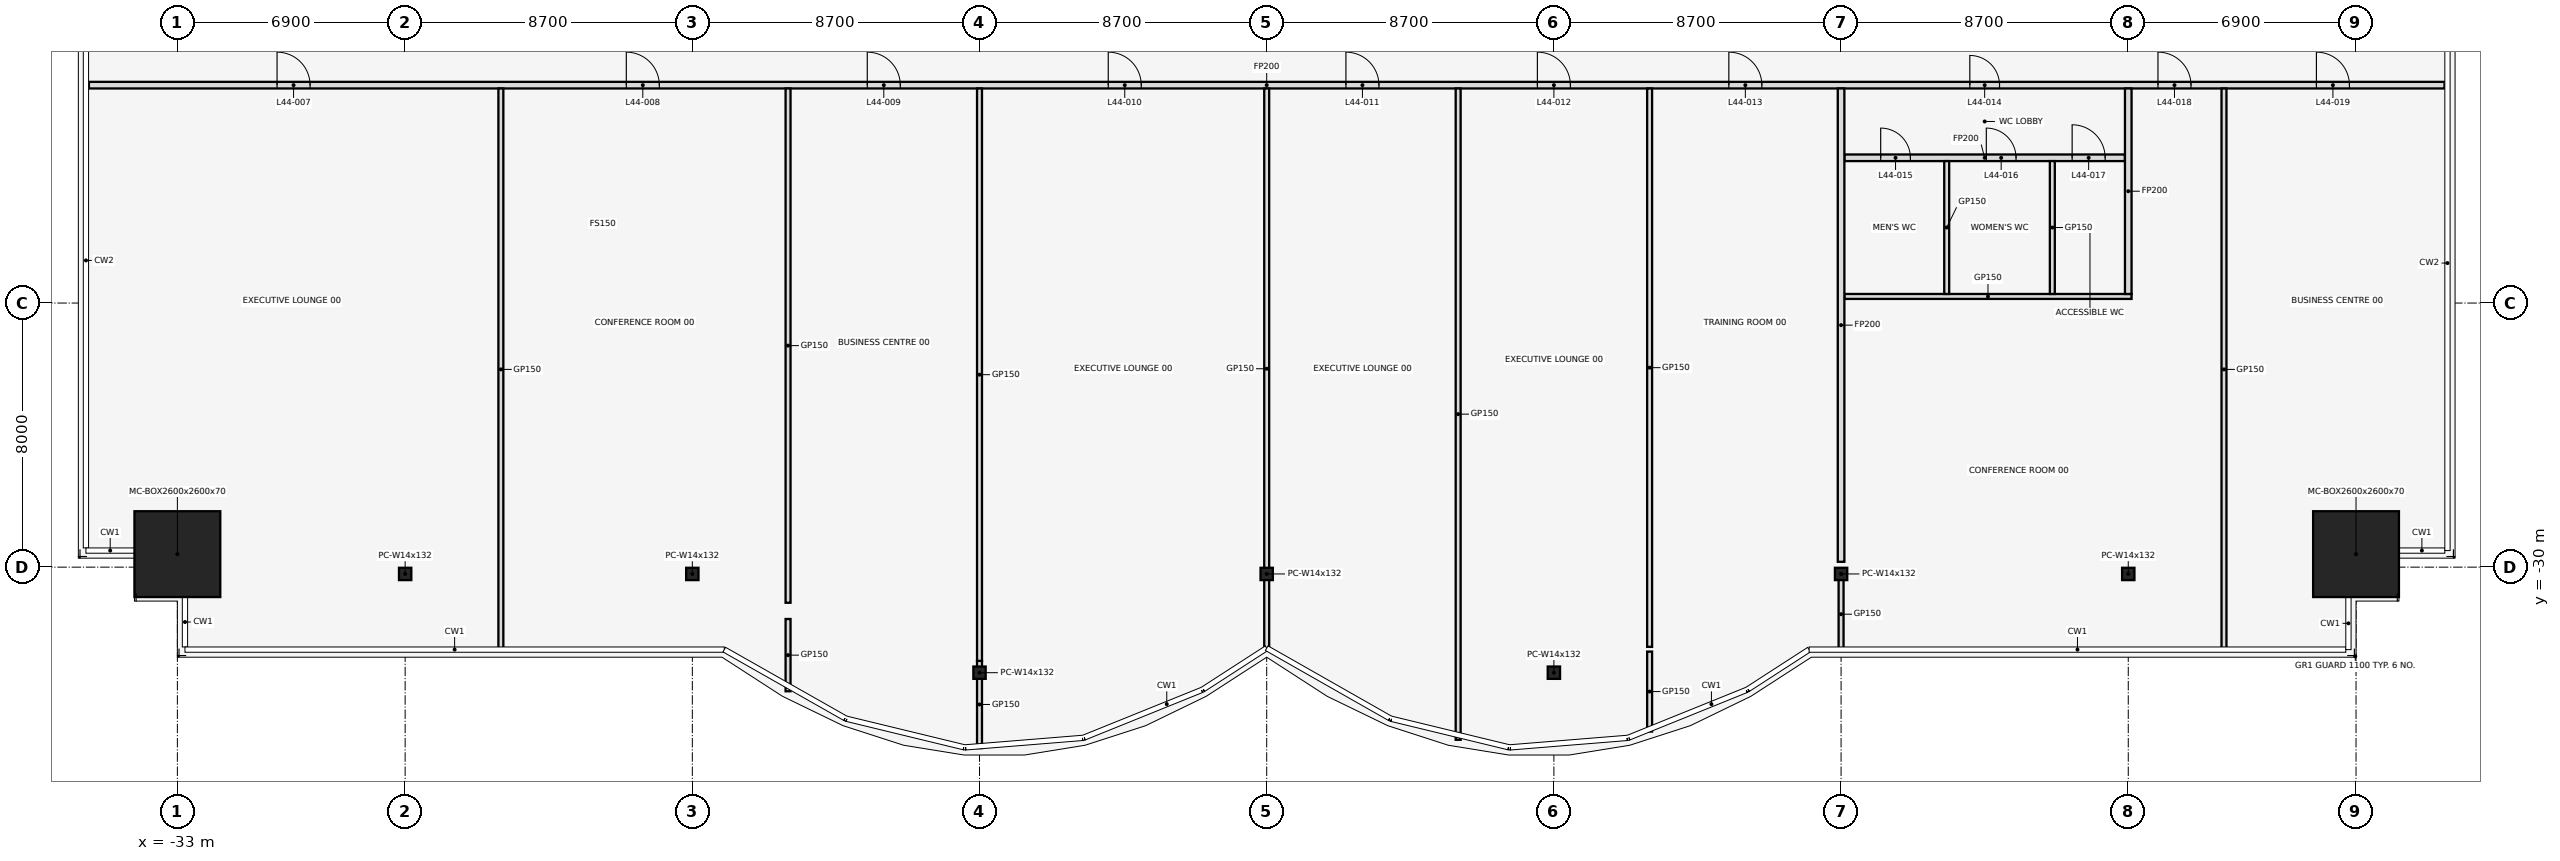
"""IFC4 building model, lengths in metres.
Left out: names, types, materials, properties, quantities, classifications, styles, units other than length and angle.
Written with IfcOpenShell. Run it as: python <this file> out.ifc"""

import sys

from ifc_helpers import new_model, si_unit, direction, frame, frame_2d, origin, origin_2d, place, context, subcontext, project, spatial, rectangle, hollow_rectangle, i_section, extrude, element, fill, save


model = new_model("IFC4")
c1 = context("Model", 3, precision=1e-05, world=origin(), true_north=direction((0.0, 1.0)))
c2 = subcontext(c1, "Body", "Model", "MODEL_VIEW")
j1 = project(units=[si_unit("LENGTHUNIT", "METRE"), si_unit("PLANEANGLEUNIT", "RADIAN")], contexts=[c1])
p1 = place(None, origin())
s1 = spatial("IfcSite", under=j1, at=p1, CompositionType="ELEMENT")
p2 = place(p1, origin())
s2 = spatial("IfcBuilding", under=s1, at=p2, CompositionType="ELEMENT")
p3 = place(p2, frame((0.0, 0.0, 199.1)))
s3 = spatial("IfcBuildingStorey", under=s2, at=p3, CompositionType="ELEMENT", Elevation=199.1)
p4 = place(p3, frame((-33.0, -29.606, 0.0), z_axis=(0.0, 0.0, 1.0), x_axis=(1.0, 0.0, 0.0)))
e1 = element("IfcColumn", 1, at=p4, inside=s3, PredefinedType="COLUMN", context=c2, shape_type="SweptSolid", body=[
    extrude(hollow_rectangle(XDim=2.6, YDim=2.6, WallThickness=0.07, at=origin_2d()), origin(), (0.0, 0.0, 1.0), 4.1),
])
for number, where, z_axis, x_axis in (
    (2, (-26.1, -30.206, 0.0), (0.0, 0.0, 1.0), (1.0, 0.0, 0.0)),
    (3, (-17.4, -30.206, 0.0), (0.0, 0.0, 1.0), (1.0, 0.0, 0.0)),
    (4, (-8.7, -33.197, 0.0), (0.0, 0.0, 1.0), (1.0, 0.0, 0.0)),
    (5, (0.0, -30.206, 0.0), (0.0, 0.0, 1.0), (1.0, 0.0, 0.0)),
    (6, (8.7, -33.197, 0.0), (0.0, 0.0, 1.0), (1.0, 0.0, 0.0)),
    (7, (17.4, -30.206, 0.0), (0.0, 0.0, 1.0), (1.0, 0.0, 0.0)),
    (8, (26.1, -30.206, 0.0), (0.0, 0.0, 1.0), (1.0, 0.0, 0.0)),
):
    element("IfcColumn", number, at=place(p3, frame(where, z_axis=z_axis, x_axis=x_axis)), inside=s3, PredefinedType="COLUMN", context=c2, shape_type="SweptSolid", body=[
        extrude(i_section(OverallWidth=0.373, OverallDepth=0.373, WebThickness=0.016, FlangeThickness=0.026, at=origin_2d()), origin(), (0.0, 0.0, 1.0), 4.1),
    ])
p5 = place(p3, frame((33.0, -29.606, 0.0), z_axis=(0.0, 0.0, 1.0), x_axis=(1.0, 0.0, 0.0)))
e9 = element("IfcColumn", 9, at=p5, inside=s3, PredefinedType="COLUMN", context=c2, shape_type="SweptSolid", body=[
    extrude(hollow_rectangle(XDim=2.6, YDim=2.6, WallThickness=0.07, at=origin_2d()), origin(), (0.0, 0.0, 1.0), 4.1),
])
p6 = place(p3, frame((17.5, -21.8, 0.0), z_axis=(0.0, 0.0, 1.0), x_axis=(1.0, 0.0, 0.0)))
e10 = element("IfcWall", 10, at=p6, inside=s3, PredefinedType="PARTITIONING", context=c2, shape_type="SweptSolid", body=[
    extrude(rectangle(XDim=8.7, YDim=0.15, at=frame_2d((4.35, 0.0))), origin(), (0.0, 0.0, 1.0), 2.84),
])
p7 = place(p3, frame((17.5, -17.6, 0.0), z_axis=(0.0, 0.0, 1.0), x_axis=(1.0, 0.0, 0.0)))
e11 = element("IfcWall", 11, at=p7, inside=s3, PredefinedType="PARTITIONING", context=c2, shape_type="SweptSolid", body=[
    extrude(rectangle(XDim=8.5, YDim=0.2, at=frame_2d((4.25, 0.0))), origin(), (0.0, 0.0, 1.0), 2.84),
])
p8 = place(p7, frame((1.1, 0.0, 0.0)))
e12 = element("IfcOpeningElement", 12, at=p8, cuts=e11, PredefinedType="OPENING", context=c2, shape_type="SweptSolid", body=[
    extrude(rectangle(XDim=0.9, YDim=2.1, at=frame_2d((0.45, 1.05))), frame((0.0, 0.112, 0.0), z_axis=(0.0, -1.0, 0.0), x_axis=(1.0, 0.0, 0.0)), (0.0, 0.0, 1.0), 0.224),
])
p9 = place(p7, frame((4.3, 0.0, 0.0)))
e13 = element("IfcOpeningElement", 13, at=p9, cuts=e11, PredefinedType="OPENING", context=c2, shape_type="SweptSolid", body=[
    extrude(rectangle(XDim=0.9, YDim=2.1, at=frame_2d((0.45, 1.05))), frame((0.0, 0.112, 0.0), z_axis=(0.0, -1.0, 0.0), x_axis=(1.0, 0.0, 0.0)), (0.0, 0.0, 1.0), 0.224),
])
p10 = place(p7, frame((6.9, 0.0, 0.0)))
e14 = element("IfcOpeningElement", 14, at=p10, cuts=e11, PredefinedType="OPENING", context=c2, shape_type="SweptSolid", body=[
    extrude(rectangle(XDim=1.0, YDim=2.1, at=frame_2d((0.5, 1.05))), frame((0.0, 0.112, 0.0), z_axis=(0.0, -1.0, 0.0), x_axis=(1.0, 0.0, 0.0)), (0.0, 0.0, 1.0), 0.224),
])
p11 = place(p3, frame((-35.68, -15.4, 0.0), z_axis=(0.0, 0.0, 1.0), x_axis=(1.0, 0.0, 0.0)))
e15 = element("IfcWall", 15, at=p11, inside=s3, PredefinedType="PARTITIONING", context=c2, shape_type="SweptSolid", body=[
    extrude(rectangle(XDim=71.36, YDim=0.2, at=frame_2d((35.68, 0.0))), origin(), (0.0, 0.0, 1.0), 2.84),
])
p12 = place(p11, frame((5.7, 0.0, 0.0)))
e16 = element("IfcOpeningElement", 16, at=p12, cuts=e15, PredefinedType="OPENING", context=c2, shape_type="SweptSolid", body=[
    extrude(rectangle(XDim=1.0, YDim=2.1, at=frame_2d((0.5, 1.05))), frame((0.0, 0.112, 0.0), z_axis=(0.0, -1.0, 0.0), x_axis=(1.0, 0.0, 0.0)), (0.0, 0.0, 1.0), 0.224),
])
p13 = place(p11, frame((16.28, 0.0, 0.0)))
e17 = element("IfcOpeningElement", 17, at=p13, cuts=e15, PredefinedType="OPENING", context=c2, shape_type="SweptSolid", body=[
    extrude(rectangle(XDim=1.0, YDim=2.1, at=frame_2d((0.5, 1.05))), frame((0.0, 0.112, 0.0), z_axis=(0.0, -1.0, 0.0), x_axis=(1.0, 0.0, 0.0)), (0.0, 0.0, 1.0), 0.224),
])
p14 = place(p11, frame((23.58, 0.0, 0.0)))
e18 = element("IfcOpeningElement", 18, at=p14, cuts=e15, PredefinedType="OPENING", context=c2, shape_type="SweptSolid", body=[
    extrude(rectangle(XDim=1.0, YDim=2.1, at=frame_2d((0.5, 1.05))), frame((0.0, 0.112, 0.0), z_axis=(0.0, -1.0, 0.0), x_axis=(1.0, 0.0, 0.0)), (0.0, 0.0, 1.0), 0.224),
])
p15 = place(p11, frame((30.88, 0.0, 0.0)))
e19 = element("IfcOpeningElement", 19, at=p15, cuts=e15, PredefinedType="OPENING", context=c2, shape_type="SweptSolid", body=[
    extrude(rectangle(XDim=1.0, YDim=2.1, at=frame_2d((0.5, 1.05))), frame((0.0, 0.112, 0.0), z_axis=(0.0, -1.0, 0.0), x_axis=(1.0, 0.0, 0.0)), (0.0, 0.0, 1.0), 0.224),
])
p16 = place(p11, frame((38.08, 0.0, 0.0)))
e20 = element("IfcOpeningElement", 20, at=p16, cuts=e15, PredefinedType="OPENING", context=c2, shape_type="SweptSolid", body=[
    extrude(rectangle(XDim=1.0, YDim=2.1, at=frame_2d((0.5, 1.05))), frame((0.0, 0.112, 0.0), z_axis=(0.0, -1.0, 0.0), x_axis=(1.0, 0.0, 0.0)), (0.0, 0.0, 1.0), 0.224),
])
p17 = place(p11, frame((43.88, 0.0, 0.0)))
e21 = element("IfcOpeningElement", 21, at=p17, cuts=e15, PredefinedType="OPENING", context=c2, shape_type="SweptSolid", body=[
    extrude(rectangle(XDim=1.0, YDim=2.1, at=frame_2d((0.5, 1.05))), frame((0.0, 0.112, 0.0), z_axis=(0.0, -1.0, 0.0), x_axis=(1.0, 0.0, 0.0)), (0.0, 0.0, 1.0), 0.224),
])
p18 = place(p11, frame((49.68, 0.0, 0.0)))
e22 = element("IfcOpeningElement", 22, at=p18, cuts=e15, PredefinedType="OPENING", context=c2, shape_type="SweptSolid", body=[
    extrude(rectangle(XDim=1.0, YDim=2.1, at=frame_2d((0.5, 1.05))), frame((0.0, 0.112, 0.0), z_axis=(0.0, -1.0, 0.0), x_axis=(1.0, 0.0, 0.0)), (0.0, 0.0, 1.0), 0.224),
])
p19 = place(p11, frame((56.98, 0.0, 0.0)))
e23 = element("IfcOpeningElement", 23, at=p19, cuts=e15, PredefinedType="OPENING", context=c2, shape_type="SweptSolid", body=[
    extrude(rectangle(XDim=0.9, YDim=2.1, at=frame_2d((0.45, 1.05))), frame((0.0, 0.112, 0.0), z_axis=(0.0, -1.0, 0.0), x_axis=(1.0, 0.0, 0.0)), (0.0, 0.0, 1.0), 0.224),
])
p20 = place(p11, frame((62.68, 0.0, 0.0)))
e24 = element("IfcOpeningElement", 24, at=p20, cuts=e15, PredefinedType="OPENING", context=c2, shape_type="SweptSolid", body=[
    extrude(rectangle(XDim=1.0, YDim=2.1, at=frame_2d((0.5, 1.05))), frame((0.0, 0.112, 0.0), z_axis=(0.0, -1.0, 0.0), x_axis=(1.0, 0.0, 0.0)), (0.0, 0.0, 1.0), 0.224),
])
p21 = place(p11, frame((67.48, 0.0, 0.0)))
e25 = element("IfcOpeningElement", 25, at=p21, cuts=e15, PredefinedType="OPENING", context=c2, shape_type="SweptSolid", body=[
    extrude(rectangle(XDim=1.0, YDim=2.1, at=frame_2d((0.5, 1.05))), frame((0.0, 0.112, 0.0), z_axis=(0.0, -1.0, 0.0), x_axis=(1.0, 0.0, 0.0)), (0.0, 0.0, 1.0), 0.224),
])
p22 = place(p3, frame((-23.2, -32.52, 0.0), z_axis=(0.0, 0.0, 1.0), x_axis=(0.0, 1.0, 0.0)))
e26 = element("IfcWall", 26, at=p22, inside=s3, PredefinedType="PARTITIONING", context=c2, shape_type="SweptSolid", body=[
    extrude(rectangle(XDim=17.02, YDim=0.15, at=frame_2d((8.51, 0.0))), origin(), (0.0, 0.0, 1.0), 2.84),
])
p23 = place(p3, frame((-14.5, -33.76, 0.0), z_axis=(0.0, 0.0, 1.0), x_axis=(0.0, 1.0, 0.0)))
e27 = element("IfcWall", 27, at=p23, inside=s3, PredefinedType="PARTITIONING", context=c2, shape_type="SweptSolid", body=[
    extrude(rectangle(XDim=2.189, YDim=0.15, at=frame_2d((1.095, 0.0))), origin(), (0.0, 0.0, 1.0), 2.84),
])
p24 = place(p3, frame((-14.5, -31.079, 0.0), z_axis=(0.0, 0.0, 1.0), x_axis=(0.0, 1.0, 0.0)))
e28 = element("IfcWall", 28, at=p24, inside=s3, PredefinedType="PARTITIONING", context=c2, shape_type="SweptSolid", body=[
    extrude(rectangle(XDim=15.579, YDim=0.15, at=frame_2d((7.79, 0.0))), origin(), (0.0, 0.0, 1.0), 2.84),
])
p25 = place(p3, frame((-8.7, -35.48, 0.0), z_axis=(0.0, 0.0, 1.0), x_axis=(0.0, 1.0, 0.0)))
e29 = element("IfcWall", 29, at=p25, inside=s3, PredefinedType="PARTITIONING", context=c2, shape_type="SweptSolid", body=[
    extrude(rectangle(XDim=2.641, YDim=0.15, at=frame_2d((1.32, 0.0))), origin(), (0.0, 0.0, 1.0), 2.84),
])
p26 = place(p3, frame((-8.7, -32.839, 0.0), z_axis=(0.0, 0.0, 1.0), x_axis=(0.0, 1.0, 0.0)))
e30 = element("IfcWall", 30, at=p26, inside=s3, PredefinedType="PARTITIONING", context=c2, shape_type="SweptSolid", body=[
    extrude(rectangle(XDim=17.339, YDim=0.15, at=frame_2d((8.669, 0.0))), origin(), (0.0, 0.0, 1.0), 2.84),
])
p27 = place(p3, frame((0.0, -32.48, 0.0), z_axis=(0.0, 0.0, 1.0), x_axis=(0.0, 1.0, 0.0)))
e31 = element("IfcWall", 31, at=p27, inside=s3, PredefinedType="PARTITIONING", context=c2, shape_type="SweptSolid", body=[
    extrude(rectangle(XDim=16.98, YDim=0.15, at=frame_2d((8.49, 0.0))), origin(), (0.0, 0.0, 1.0), 2.84),
])
p28 = place(p3, frame((5.8, -35.23, 0.0), z_axis=(0.0, 0.0, 1.0), x_axis=(0.0, 1.0, 0.0)))
e32 = element("IfcWall", 32, at=p28, inside=s3, PredefinedType="PARTITIONING", context=c2, shape_type="SweptSolid", body=[
    extrude(rectangle(XDim=19.73, YDim=0.15, at=frame_2d((9.865, 0.0))), origin(), (0.0, 0.0, 1.0), 2.84),
])
p29 = place(p3, frame((11.6, -34.98, 0.0), z_axis=(0.0, 0.0, 1.0), x_axis=(0.0, 1.0, 0.0)))
e33 = element("IfcWall", 33, at=p29, inside=s3, PredefinedType="PARTITIONING", context=c2, shape_type="SweptSolid", body=[
    extrude(rectangle(XDim=2.422, YDim=0.15, at=frame_2d((1.211, 0.0))), origin(), (0.0, 0.0, 1.0), 2.84),
])
p30 = place(p3, frame((11.6, -32.415, 0.0), z_axis=(0.0, 0.0, 1.0), x_axis=(0.0, 1.0, 0.0)))
e34 = element("IfcWall", 34, at=p30, inside=s3, PredefinedType="PARTITIONING", context=c2, shape_type="SweptSolid", body=[
    extrude(rectangle(XDim=16.915, YDim=0.15, at=frame_2d((8.458, 0.0))), origin(), (0.0, 0.0, 1.0), 2.84),
])
p31 = place(p3, frame((17.4, -32.52, 0.0), z_axis=(0.0, 0.0, 1.0), x_axis=(0.0, 1.0, 0.0)))
e35 = element("IfcWall", 35, at=p31, inside=s3, PredefinedType="PARTITIONING", context=c2, shape_type="SweptSolid", body=[
    extrude(rectangle(XDim=2.19, YDim=0.15, at=frame_2d((1.095, 0.0))), origin(), (0.0, 0.0, 1.0), 2.84),
])
p32 = place(p3, frame((17.4, -29.838, 0.0), z_axis=(0.0, 0.0, 1.0), x_axis=(0.0, 1.0, 0.0)))
e36 = element("IfcWall", 36, at=p32, inside=s3, PredefinedType="PARTITIONING", context=c2, shape_type="SweptSolid", body=[
    extrude(rectangle(XDim=14.338, YDim=0.2, at=frame_2d((7.169, 0.0))), origin(), (0.0, 0.0, 1.0), 2.84),
])
for number, where, z_axis, x_axis in (
    (37, (20.6, -21.725, 0.0), (0.0, 0.0, 1.0), (0.0, 1.0, 0.0)),
    (38, (23.8, -21.725, 0.0), (0.0, 0.0, 1.0), (0.0, 1.0, 0.0)),
):
    element("IfcWall", number, at=place(p3, frame(where, z_axis=z_axis, x_axis=x_axis)), inside=s3, PredefinedType="PARTITIONING", context=c2, shape_type="SweptSolid", body=[
        extrude(rectangle(XDim=4.025, YDim=0.15, at=frame_2d((2.013, 0.0))), origin(), (0.0, 0.0, 1.0), 2.84),
    ])
p33 = place(p3, frame((26.1, -21.725, 0.0), z_axis=(0.0, 0.0, 1.0), x_axis=(0.0, 1.0, 0.0)))
e39 = element("IfcWall", 39, at=p33, inside=s3, PredefinedType="PARTITIONING", context=c2, shape_type="SweptSolid", body=[
    extrude(rectangle(XDim=6.225, YDim=0.2, at=frame_2d((3.113, 0.0))), origin(), (0.0, 0.0, 1.0), 2.84),
])
p34 = place(p3, frame((29.0, -32.52, 0.0), z_axis=(0.0, 0.0, 1.0), x_axis=(0.0, 1.0, 0.0)))
e40 = element("IfcWall", 40, at=p34, inside=s3, PredefinedType="PARTITIONING", context=c2, shape_type="SweptSolid", body=[
    extrude(rectangle(XDim=17.02, YDim=0.15, at=frame_2d((8.51, 0.0))), origin(), (0.0, 0.0, 1.0), 2.84),
])
p35 = place(p12, frame((1.0, 0.0, 0.0), z_axis=(0.0, 0.0, 1.0), x_axis=(-1.0, 0.0, 0.0)))
e41 = element("IfcDoor", 41, at=p35, inside=s3, OperationType="SINGLE_SWING_LEFT", PredefinedType="DOOR", context=c2, shape_type="SweptSolid", body=[
    extrude(rectangle(XDim=1.0, YDim=2.1, at=frame_2d((0.5, 1.05))), frame((0.0, 0.025, 0.0), z_axis=(0.0, -1.0, 0.0), x_axis=(1.0, 0.0, 0.0)), (0.0, 0.0, 1.0), 0.05),
])
fill(e16, e41)
p36 = place(p13, frame((1.0, 0.0, 0.0), z_axis=(0.0, 0.0, 1.0), x_axis=(-1.0, 0.0, 0.0)))
e42 = element("IfcDoor", 42, at=p36, inside=s3, OperationType="SINGLE_SWING_RIGHT", PredefinedType="DOOR", context=c2, shape_type="SweptSolid", body=[
    extrude(rectangle(XDim=1.0, YDim=2.1, at=frame_2d((0.5, 1.05))), frame((0.0, 0.025, 0.0), z_axis=(0.0, -1.0, 0.0), x_axis=(1.0, 0.0, 0.0)), (0.0, 0.0, 1.0), 0.05),
])
fill(e17, e42)
p37 = place(p14, frame((1.0, 0.0, 0.0), z_axis=(0.0, 0.0, 1.0), x_axis=(-1.0, 0.0, 0.0)))
e43 = element("IfcDoor", 43, at=p37, inside=s3, OperationType="SINGLE_SWING_RIGHT", PredefinedType="DOOR", context=c2, shape_type="SweptSolid", body=[
    extrude(rectangle(XDim=1.0, YDim=2.1, at=frame_2d((0.5, 1.05))), frame((0.0, 0.025, 0.0), z_axis=(0.0, -1.0, 0.0), x_axis=(1.0, 0.0, 0.0)), (0.0, 0.0, 1.0), 0.05),
])
fill(e18, e43)
p38 = place(p15, frame((1.0, 0.0, 0.0), z_axis=(0.0, 0.0, 1.0), x_axis=(-1.0, 0.0, 0.0)))
e44 = element("IfcDoor", 44, at=p38, inside=s3, OperationType="SINGLE_SWING_LEFT", PredefinedType="DOOR", context=c2, shape_type="SweptSolid", body=[
    extrude(rectangle(XDim=1.0, YDim=2.1, at=frame_2d((0.5, 1.05))), frame((0.0, 0.025, 0.0), z_axis=(0.0, -1.0, 0.0), x_axis=(1.0, 0.0, 0.0)), (0.0, 0.0, 1.0), 0.05),
])
fill(e19, e44)
p39 = place(p16, frame((1.0, 0.0, 0.0), z_axis=(0.0, 0.0, 1.0), x_axis=(-1.0, 0.0, 0.0)))
e45 = element("IfcDoor", 45, at=p39, inside=s3, OperationType="SINGLE_SWING_RIGHT", PredefinedType="DOOR", context=c2, shape_type="SweptSolid", body=[
    extrude(rectangle(XDim=1.0, YDim=2.1, at=frame_2d((0.5, 1.05))), frame((0.0, 0.025, 0.0), z_axis=(0.0, -1.0, 0.0), x_axis=(1.0, 0.0, 0.0)), (0.0, 0.0, 1.0), 0.05),
])
fill(e20, e45)
p40 = place(p17, frame((1.0, 0.0, 0.0), z_axis=(0.0, 0.0, 1.0), x_axis=(-1.0, 0.0, 0.0)))
e46 = element("IfcDoor", 46, at=p40, inside=s3, OperationType="SINGLE_SWING_RIGHT", PredefinedType="DOOR", context=c2, shape_type="SweptSolid", body=[
    extrude(rectangle(XDim=1.0, YDim=2.1, at=frame_2d((0.5, 1.05))), frame((0.0, 0.025, 0.0), z_axis=(0.0, -1.0, 0.0), x_axis=(1.0, 0.0, 0.0)), (0.0, 0.0, 1.0), 0.05),
])
fill(e21, e46)
p41 = place(p18, frame((1.0, 0.0, 0.0), z_axis=(0.0, 0.0, 1.0), x_axis=(-1.0, 0.0, 0.0)))
e47 = element("IfcDoor", 47, at=p41, inside=s3, OperationType="SINGLE_SWING_LEFT", PredefinedType="DOOR", context=c2, shape_type="SweptSolid", body=[
    extrude(rectangle(XDim=1.0, YDim=2.1, at=frame_2d((0.5, 1.05))), frame((0.0, 0.025, 0.0), z_axis=(0.0, -1.0, 0.0), x_axis=(1.0, 0.0, 0.0)), (0.0, 0.0, 1.0), 0.05),
])
fill(e22, e47)
p42 = place(p19, frame((0.9, 0.0, 0.0), z_axis=(0.0, 0.0, 1.0), x_axis=(-1.0, 0.0, 0.0)))
e48 = element("IfcDoor", 48, at=p42, inside=s3, OperationType="SINGLE_SWING_RIGHT", PredefinedType="DOOR", context=c2, shape_type="SweptSolid", body=[
    extrude(rectangle(XDim=0.9, YDim=2.1, at=frame_2d((0.45, 1.05))), frame((0.0, 0.025, 0.0), z_axis=(0.0, -1.0, 0.0), x_axis=(1.0, 0.0, 0.0)), (0.0, 0.0, 1.0), 0.05),
])
fill(e23, e48)
p43 = place(p8, frame((0.9, 0.0, 0.0), z_axis=(0.0, 0.0, 1.0), x_axis=(-1.0, 0.0, 0.0)))
e49 = element("IfcDoor", 49, at=p43, inside=s3, OperationType="SINGLE_SWING_RIGHT", PredefinedType="DOOR", context=c2, shape_type="SweptSolid", body=[
    extrude(rectangle(XDim=0.9, YDim=2.1, at=frame_2d((0.45, 1.05))), frame((0.0, 0.025, 0.0), z_axis=(0.0, -1.0, 0.0), x_axis=(1.0, 0.0, 0.0)), (0.0, 0.0, 1.0), 0.05),
])
fill(e12, e49)
p44 = place(p9, frame((0.9, 0.0, 0.0), z_axis=(0.0, 0.0, 1.0), x_axis=(-1.0, 0.0, 0.0)))
e50 = element("IfcDoor", 50, at=p44, inside=s3, OperationType="SINGLE_SWING_LEFT", PredefinedType="DOOR", context=c2, shape_type="SweptSolid", body=[
    extrude(rectangle(XDim=0.9, YDim=2.1, at=frame_2d((0.45, 1.05))), frame((0.0, 0.025, 0.0), z_axis=(0.0, -1.0, 0.0), x_axis=(1.0, 0.0, 0.0)), (0.0, 0.0, 1.0), 0.05),
])
fill(e13, e50)
p45 = place(p10, frame((1.0, 0.0, 0.0), z_axis=(0.0, 0.0, 1.0), x_axis=(-1.0, 0.0, 0.0)))
e51 = element("IfcDoor", 51, at=p45, inside=s3, OperationType="SINGLE_SWING_RIGHT", PredefinedType="DOOR", context=c2, shape_type="SweptSolid", body=[
    extrude(rectangle(XDim=1.0, YDim=2.1, at=frame_2d((0.5, 1.05))), frame((0.0, 0.025, 0.0), z_axis=(0.0, -1.0, 0.0), x_axis=(1.0, 0.0, 0.0)), (0.0, 0.0, 1.0), 0.05),
])
fill(e14, e51)
p46 = place(p20, frame((1.0, 0.0, 0.0), z_axis=(0.0, 0.0, 1.0), x_axis=(-1.0, 0.0, 0.0)))
e52 = element("IfcDoor", 52, at=p46, inside=s3, OperationType="SINGLE_SWING_RIGHT", PredefinedType="DOOR", context=c2, shape_type="SweptSolid", body=[
    extrude(rectangle(XDim=1.0, YDim=2.1, at=frame_2d((0.5, 1.05))), frame((0.0, 0.025, 0.0), z_axis=(0.0, -1.0, 0.0), x_axis=(1.0, 0.0, 0.0)), (0.0, 0.0, 1.0), 0.05),
])
fill(e24, e52)
p47 = place(p21, frame((1.0, 0.0, 0.0), z_axis=(0.0, 0.0, 1.0), x_axis=(-1.0, 0.0, 0.0)))
e53 = element("IfcDoor", 53, at=p47, inside=s3, OperationType="SINGLE_SWING_LEFT", PredefinedType="DOOR", context=c2, shape_type="SweptSolid", body=[
    extrude(rectangle(XDim=1.0, YDim=2.1, at=frame_2d((0.5, 1.05))), frame((0.0, 0.025, 0.0), z_axis=(0.0, -1.0, 0.0), x_axis=(1.0, 0.0, 0.0)), (0.0, 0.0, 1.0), 0.05),
])
fill(e25, e53)
save(model, sys.argv[1])
